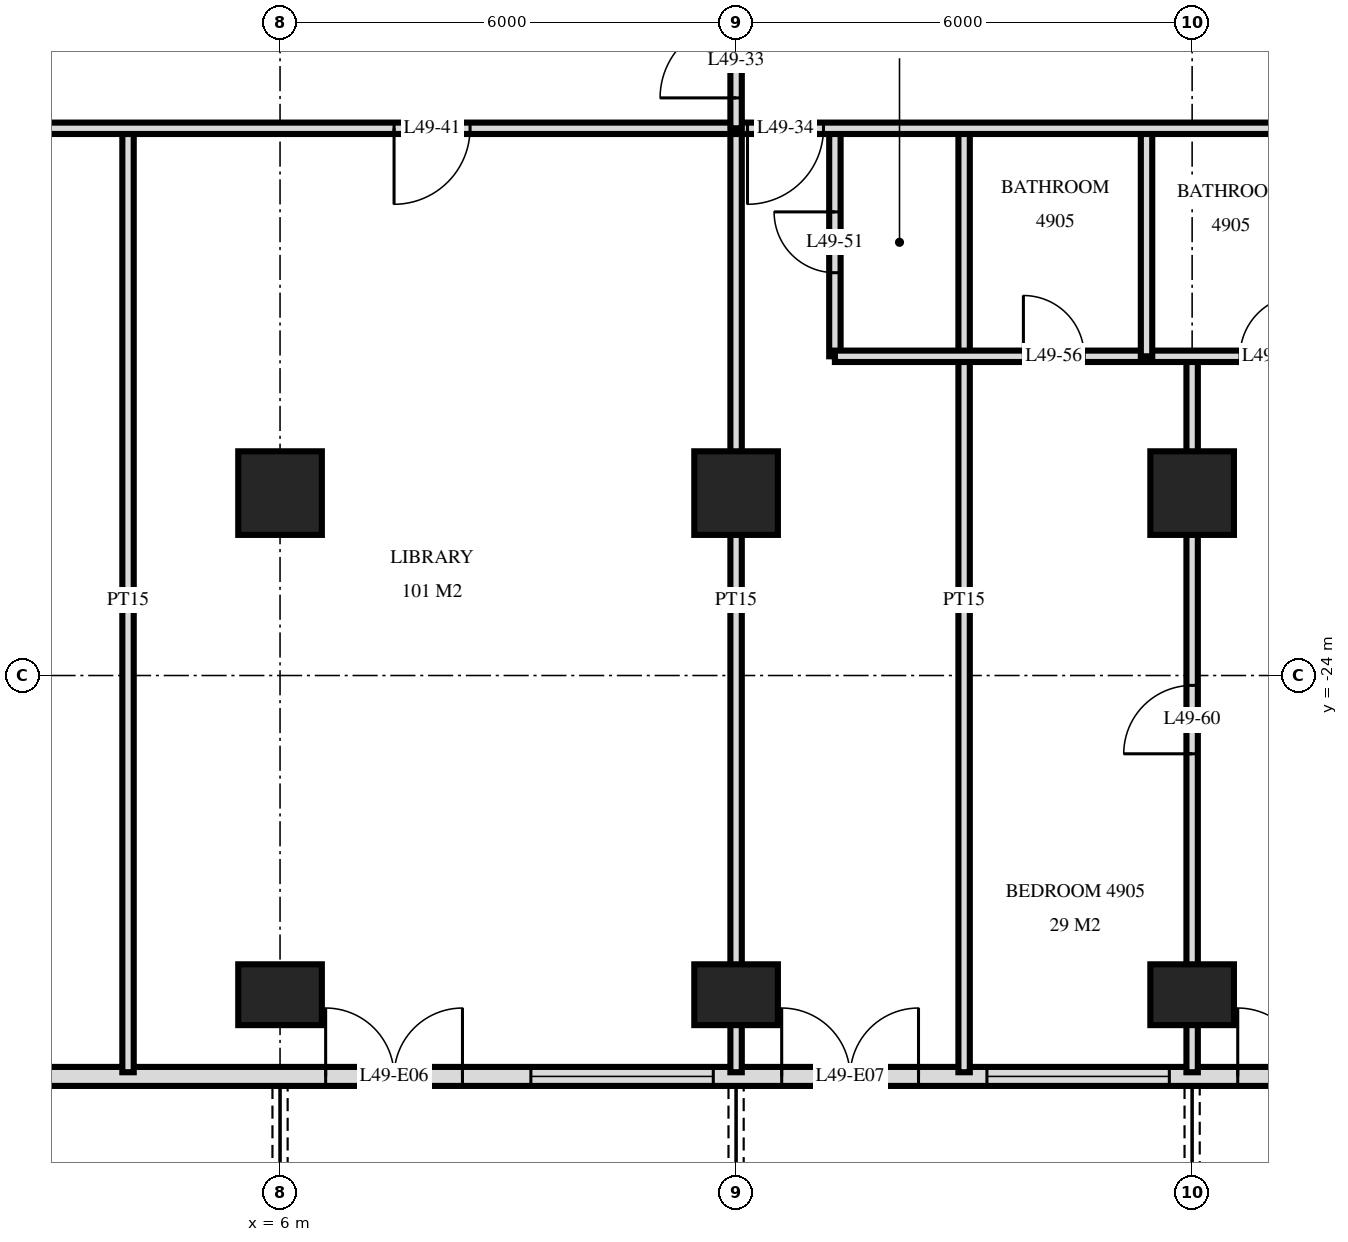
"""IFC4 building model, lengths in metres.
Left out: names, types, materials, properties, quantities, classifications, styles, units other than length and angle.
Written with IfcOpenShell. Run it as: python <this file> out.ifc"""

import sys

from ifc_helpers import new_model, si_unit, direction, frame, frame_2d, origin, origin_2d, place, context, subcontext, project, spatial, rectangle, extrude, element, fill, save


model = new_model("IFC4")
c1 = context("Model", 3, precision=1e-05, world=origin(), true_north=direction((0.0, 1.0)))
c2 = subcontext(c1, "Body", "Model", "MODEL_VIEW")
j1 = project(units=[si_unit("LENGTHUNIT", "METRE"), si_unit("PLANEANGLEUNIT", "RADIAN")], contexts=[c1])
p1 = place(None, origin())
s1 = spatial("IfcSite", under=j1, at=p1, CompositionType="ELEMENT")
p2 = place(p1, origin())
s2 = spatial("IfcBuilding", under=s1, at=p2, CompositionType="ELEMENT")
p3 = place(p2, frame((0.0, 0.0, 190.6)))
s3 = spatial("IfcBuildingStorey", under=s2, at=p3, CompositionType="ELEMENT", Elevation=190.6)
p4 = place(p3, frame((6.0, -28.2, 0.0), z_axis=(0.0, 0.0, 1.0), x_axis=(1.0, 0.0, 0.0)))
e1 = element("IfcColumn", 1, at=p4, inside=s3, PredefinedType="COLUMN", context=c2, shape_type="SweptSolid", body=[
    extrude(rectangle(XDim=1.1, YDim=0.8, at=origin_2d()), origin(), (0.0, 0.0, 1.0), 3.5),
])
p5 = place(p3, frame((6.0, -21.6, 0.0), z_axis=(0.0, 0.0, 1.0), x_axis=(1.0, 0.0, 0.0)))
e2 = element("IfcColumn", 2, at=p5, inside=s3, PredefinedType="COLUMN", context=c2, shape_type="SweptSolid", body=[
    extrude(rectangle(XDim=1.1, YDim=1.1, at=origin_2d()), origin(), (0.0, 0.0, 1.0), 3.5),
])
p6 = place(p3, frame((12.0, -28.2, 0.0), z_axis=(0.0, 0.0, 1.0), x_axis=(1.0, 0.0, 0.0)))
e3 = element("IfcColumn", 3, at=p6, inside=s3, PredefinedType="COLUMN", context=c2, shape_type="SweptSolid", body=[
    extrude(rectangle(XDim=1.1, YDim=0.8, at=origin_2d()), origin(), (0.0, 0.0, 1.0), 3.5),
])
p7 = place(p3, frame((12.0, -21.6, 0.0), z_axis=(0.0, 0.0, 1.0), x_axis=(1.0, 0.0, 0.0)))
e4 = element("IfcColumn", 4, at=p7, inside=s3, PredefinedType="COLUMN", context=c2, shape_type="SweptSolid", body=[
    extrude(rectangle(XDim=1.1, YDim=1.1, at=origin_2d()), origin(), (0.0, 0.0, 1.0), 3.5),
])
p8 = place(p3, frame((18.0, -28.2, 0.0), z_axis=(0.0, 0.0, 1.0), x_axis=(1.0, 0.0, 0.0)))
e5 = element("IfcColumn", 5, at=p8, inside=s3, PredefinedType="COLUMN", context=c2, shape_type="SweptSolid", body=[
    extrude(rectangle(XDim=1.1, YDim=0.8, at=origin_2d()), origin(), (0.0, 0.0, 1.0), 3.5),
])
p9 = place(p3, frame((18.0, -21.6, 0.0), z_axis=(0.0, 0.0, 1.0), x_axis=(1.0, 0.0, 0.0)))
e6 = element("IfcColumn", 6, at=p9, inside=s3, PredefinedType="COLUMN", context=c2, shape_type="SweptSolid", body=[
    extrude(rectangle(XDim=1.1, YDim=1.1, at=origin_2d()), origin(), (0.0, 0.0, 1.0), 3.5),
])
p10 = place(p3, frame((-22.475, -29.275, 0.0), z_axis=(0.0, 0.0, 1.0), x_axis=(1.0, 0.0, 0.0)))
e7 = element("IfcWall", 7, at=p10, inside=s3, PredefinedType="SOLIDWALL", context=c2, shape_type="SweptSolid", body=[
    extrude(rectangle(XDim=44.951, YDim=0.25, at=frame_2d((22.475, 0.0))), origin(), (0.0, 0.0, 1.0), 3.22),
])
p11 = place(p10, frame((0.575, 0.0, 0.0)))
e8 = element("IfcOpeningElement", 8, at=p11, cuts=e7, PredefinedType="OPENING", context=c2, shape_type="SweptSolid", body=[
    extrude(rectangle(XDim=1.8, YDim=2.4, at=frame_2d((0.9, 1.2))), frame((0.0, 0.135, 0.0), z_axis=(0.0, -1.0, 0.0), x_axis=(1.0, 0.0, 0.0)), (0.0, 0.0, 1.0), 0.27),
])
p12 = place(p10, frame((4.775, 0.0, 0.9)))
e9 = element("IfcOpeningElement", 9, at=p12, cuts=e7, PredefinedType="OPENING", context=c2, shape_type="SweptSolid", body=[
    extrude(rectangle(XDim=2.4, YDim=1.5, at=frame_2d((1.2, 0.75))), frame((0.0, 0.135, 0.0), z_axis=(0.0, -1.0, 0.0), x_axis=(1.0, 0.0, 0.0)), (0.0, 0.0, 1.0), 0.27),
])
p13 = place(p10, frame((8.075, 0.0, 0.0)))
e10 = element("IfcOpeningElement", 10, at=p13, cuts=e7, PredefinedType="OPENING", context=c2, shape_type="SweptSolid", body=[
    extrude(rectangle(XDim=1.8, YDim=2.4, at=frame_2d((0.9, 1.2))), frame((0.0, 0.135, 0.0), z_axis=(0.0, -1.0, 0.0), x_axis=(1.0, 0.0, 0.0)), (0.0, 0.0, 1.0), 0.27),
])
p14 = place(p10, frame((11.075, 0.0, 0.0)))
e11 = element("IfcOpeningElement", 11, at=p14, cuts=e7, PredefinedType="OPENING", context=c2, shape_type="SweptSolid", body=[
    extrude(rectangle(XDim=1.8, YDim=2.4, at=frame_2d((0.9, 1.2))), frame((0.0, 0.135, 0.0), z_axis=(0.0, -1.0, 0.0), x_axis=(1.0, 0.0, 0.0)), (0.0, 0.0, 1.0), 0.27),
])
p15 = place(p10, frame((13.775, 0.0, 0.9)))
e12 = element("IfcOpeningElement", 12, at=p15, cuts=e7, PredefinedType="OPENING", context=c2, shape_type="SweptSolid", body=[
    extrude(rectangle(XDim=2.4, YDim=1.5, at=frame_2d((1.2, 0.75))), frame((0.0, 0.135, 0.0), z_axis=(0.0, -1.0, 0.0), x_axis=(1.0, 0.0, 0.0)), (0.0, 0.0, 1.0), 0.27),
])
p16 = place(p10, frame((20.075, 0.0, 0.0)))
e13 = element("IfcOpeningElement", 13, at=p16, cuts=e7, PredefinedType="OPENING", context=c2, shape_type="SweptSolid", body=[
    extrude(rectangle(XDim=1.8, YDim=2.4, at=frame_2d((0.9, 1.2))), frame((0.0, 0.135, 0.0), z_axis=(0.0, -1.0, 0.0), x_axis=(1.0, 0.0, 0.0)), (0.0, 0.0, 1.0), 0.27),
])
p17 = place(p10, frame((23.075, 0.0, 0.0)))
e14 = element("IfcOpeningElement", 14, at=p17, cuts=e7, PredefinedType="OPENING", context=c2, shape_type="SweptSolid", body=[
    extrude(rectangle(XDim=1.8, YDim=2.4, at=frame_2d((0.9, 1.2))), frame((0.0, 0.135, 0.0), z_axis=(0.0, -1.0, 0.0), x_axis=(1.0, 0.0, 0.0)), (0.0, 0.0, 1.0), 0.27),
])
p18 = place(p10, frame((29.075, 0.0, 0.0)))
e15 = element("IfcOpeningElement", 15, at=p18, cuts=e7, PredefinedType="OPENING", context=c2, shape_type="SweptSolid", body=[
    extrude(rectangle(XDim=1.8, YDim=2.4, at=frame_2d((0.9, 1.2))), frame((0.0, 0.135, 0.0), z_axis=(0.0, -1.0, 0.0), x_axis=(1.0, 0.0, 0.0)), (0.0, 0.0, 1.0), 0.27),
])
p19 = place(p10, frame((31.775, 0.0, 0.9)))
e16 = element("IfcOpeningElement", 16, at=p19, cuts=e7, PredefinedType="OPENING", context=c2, shape_type="SweptSolid", body=[
    extrude(rectangle(XDim=2.4, YDim=1.5, at=frame_2d((1.2, 0.75))), frame((0.0, 0.135, 0.0), z_axis=(0.0, -1.0, 0.0), x_axis=(1.0, 0.0, 0.0)), (0.0, 0.0, 1.0), 0.27),
])
p20 = place(p10, frame((35.075, 0.0, 0.0)))
e17 = element("IfcOpeningElement", 17, at=p20, cuts=e7, PredefinedType="OPENING", context=c2, shape_type="SweptSolid", body=[
    extrude(rectangle(XDim=1.8, YDim=2.4, at=frame_2d((0.9, 1.2))), frame((0.0, 0.135, 0.0), z_axis=(0.0, -1.0, 0.0), x_axis=(1.0, 0.0, 0.0)), (0.0, 0.0, 1.0), 0.27),
])
p21 = place(p10, frame((37.775, 0.0, 0.9)))
e18 = element("IfcOpeningElement", 18, at=p21, cuts=e7, PredefinedType="OPENING", context=c2, shape_type="SweptSolid", body=[
    extrude(rectangle(XDim=2.4, YDim=1.5, at=frame_2d((1.2, 0.75))), frame((0.0, 0.135, 0.0), z_axis=(0.0, -1.0, 0.0), x_axis=(1.0, 0.0, 0.0)), (0.0, 0.0, 1.0), 0.27),
])
p22 = place(p10, frame((41.075, 0.0, 0.0)))
e19 = element("IfcOpeningElement", 19, at=p22, cuts=e7, PredefinedType="OPENING", context=c2, shape_type="SweptSolid", body=[
    extrude(rectangle(XDim=1.8, YDim=2.4, at=frame_2d((0.9, 1.2))), frame((0.0, 0.135, 0.0), z_axis=(0.0, -1.0, 0.0), x_axis=(1.0, 0.0, 0.0)), (0.0, 0.0, 1.0), 0.27),
])
p23 = place(p3, frame((18.0, -29.22, 0.0), z_axis=(0.0, 0.0, 1.0), x_axis=(0.0, 1.0, 0.0)))
e20 = element("IfcWall", 20, at=p23, inside=s3, PredefinedType="PARTITIONING", context=c2, shape_type="SweptSolid", body=[
    extrude(rectangle(XDim=9.42, YDim=0.15, at=frame_2d((4.71, 0.0))), origin(), (0.0, 0.0, 1.0), 3.22),
])
p24 = place(p23, frame((4.19, 0.0, 0.0)))
e21 = element("IfcOpeningElement", 21, at=p24, cuts=e20, PredefinedType="OPENING", context=c2, shape_type="SweptSolid", body=[
    extrude(rectangle(XDim=0.9, YDim=2.1, at=frame_2d((0.45, 1.05))), frame((0.0, 0.085, 0.0), z_axis=(0.0, -1.0, 0.0), x_axis=(1.0, 0.0, 0.0)), (0.0, 0.0, 1.0), 0.17),
])
p25 = place(p3, frame((17.4, -19.8, 0.0), z_axis=(0.0, 0.0, 1.0), x_axis=(0.0, 1.0, 0.0)))
e22 = element("IfcWall", 22, at=p25, inside=s3, PredefinedType="PARTITIONING", context=c2, shape_type="SweptSolid", body=[
    extrude(rectangle(XDim=3.0, YDim=0.15, at=frame_2d((1.5, 0.0))), origin(), (0.0, 0.0, 1.0), 3.22),
])
p26 = place(p3, frame((15.0, -29.22, 0.0), z_axis=(0.0, 0.0, 1.0), x_axis=(0.0, 1.0, 0.0)))
e23 = element("IfcWall", 23, at=p26, inside=s3, PredefinedType="PARTITIONING", context=c2, shape_type="SweptSolid", body=[
    extrude(rectangle(XDim=12.42, YDim=0.15, at=frame_2d((6.21, 0.0))), origin(), (0.0, 0.0, 1.0), 3.22),
])
p27 = place(p3, frame((13.3, -19.8, 0.0), z_axis=(0.0, 0.0, 1.0), x_axis=(0.0, 1.0, 0.0)))
e24 = element("IfcWall", 24, at=p27, inside=s3, PredefinedType="PARTITIONING", context=c2, shape_type="SweptSolid", body=[
    extrude(rectangle(XDim=3.0, YDim=0.15, at=frame_2d((1.5, 0.0))), origin(), (0.0, 0.0, 1.0), 3.22),
])
p28 = place(p27, frame((1.1, 0.0, 0.0)))
e25 = element("IfcOpeningElement", 25, at=p28, cuts=e24, PredefinedType="OPENING", context=c2, shape_type="SweptSolid", body=[
    extrude(rectangle(XDim=0.8, YDim=2.1, at=frame_2d((0.4, 1.05))), frame((0.0, 0.085, 0.0), z_axis=(0.0, -1.0, 0.0), x_axis=(1.0, 0.0, 0.0)), (0.0, 0.0, 1.0), 0.17),
])
p29 = place(p3, frame((12.0, -16.8, 0.0), z_axis=(0.0, 0.0, 1.0), x_axis=(0.0, 1.0, 0.0)))
e26 = element("IfcWall", 26, at=p29, inside=s3, PredefinedType="PARTITIONING", context=c2, shape_type="SweptSolid", body=[
    extrude(rectangle(XDim=1.75, YDim=0.15, at=frame_2d((0.875, 0.0))), origin(), (0.0, 0.0, 1.0), 3.22),
])
p30 = place(p29, frame((0.4, 0.0, 0.0)))
e27 = element("IfcOpeningElement", 27, at=p30, cuts=e26, PredefinedType="OPENING", context=c2, shape_type="SweptSolid", body=[
    extrude(rectangle(XDim=1.0, YDim=2.1, at=frame_2d((0.5, 1.05))), frame((0.0, 0.085, 0.0), z_axis=(0.0, -1.0, 0.0), x_axis=(1.0, 0.0, 0.0)), (0.0, 0.0, 1.0), 0.17),
])
for number, where, z_axis, x_axis in (
    (28, (12.0, -29.22, 0.0), (0.0, 0.0, 1.0), (0.0, 1.0, 0.0)),
    (29, (4.0, -29.22, 0.0), (0.0, 0.0, 1.0), (0.0, 1.0, 0.0)),
):
    element("IfcWall", number, at=place(p3, frame(where, z_axis=z_axis, x_axis=x_axis)), inside=s3, PredefinedType="PARTITIONING", context=c2, shape_type="SweptSolid", body=[
        extrude(rectangle(XDim=12.42, YDim=0.15, at=frame_2d((6.21, 0.0))), origin(), (0.0, 0.0, 1.0), 3.22),
    ])
p31 = place(p3, frame((13.3, -19.8, 0.0), z_axis=(0.0, 0.0, 1.0), x_axis=(1.0, 0.0, 0.0)))
e30 = element("IfcWall", 30, at=p31, inside=s3, PredefinedType="PARTITIONING", context=c2, shape_type="SweptSolid", body=[
    extrude(rectangle(XDim=8.1, YDim=0.15, at=frame_2d((4.05, 0.0))), origin(), (0.0, 0.0, 1.0), 3.22),
])
p32 = place(p31, frame((2.48, 0.0, 0.0)))
e31 = element("IfcOpeningElement", 31, at=p32, cuts=e30, PredefinedType="OPENING", context=c2, shape_type="SweptSolid", body=[
    extrude(rectangle(XDim=0.8, YDim=2.1, at=frame_2d((0.4, 1.05))), frame((0.0, 0.085, 0.0), z_axis=(0.0, -1.0, 0.0), x_axis=(1.0, 0.0, 0.0)), (0.0, 0.0, 1.0), 0.17),
])
p33 = place(p31, frame((5.33, 0.0, 0.0)))
e32 = element("IfcOpeningElement", 32, at=p33, cuts=e30, PredefinedType="OPENING", context=c2, shape_type="SweptSolid", body=[
    extrude(rectangle(XDim=0.8, YDim=2.1, at=frame_2d((0.4, 1.05))), frame((0.0, 0.085, 0.0), z_axis=(0.0, -1.0, 0.0), x_axis=(1.0, 0.0, 0.0)), (0.0, 0.0, 1.0), 0.17),
])
p34 = place(p3, frame((-26.82, -16.8, 0.0), z_axis=(0.0, 0.0, 1.0), x_axis=(1.0, 0.0, 0.0)))
e33 = element("IfcWall", 33, at=p34, inside=s3, PredefinedType="PARTITIONING", context=c2, shape_type="SweptSolid", body=[
    extrude(rectangle(XDim=53.64, YDim=0.15, at=frame_2d((26.82, 0.0))), origin(), (0.0, 0.0, 1.0), 3.22),
])
p35 = place(p34, frame((11.97, 0.0, 0.0)))
e34 = element("IfcOpeningElement", 34, at=p35, cuts=e33, PredefinedType="OPENING", context=c2, shape_type="SweptSolid", body=[
    extrude(rectangle(XDim=1.0, YDim=2.1, at=frame_2d((0.5, 1.05))), frame((0.0, 0.085, 0.0), z_axis=(0.0, -1.0, 0.0), x_axis=(1.0, 0.0, 0.0)), (0.0, 0.0, 1.0), 0.17),
])
p36 = place(p34, frame((10.67, 0.0, 0.0)))
e35 = element("IfcOpeningElement", 35, at=p36, cuts=e33, PredefinedType="OPENING", context=c2, shape_type="SweptSolid", body=[
    extrude(rectangle(XDim=1.0, YDim=2.1, at=frame_2d((0.5, 1.05))), frame((0.0, 0.085, 0.0), z_axis=(0.0, -1.0, 0.0), x_axis=(1.0, 0.0, 0.0)), (0.0, 0.0, 1.0), 0.17),
])
p37 = place(p34, frame((3.22, 0.0, 0.0)))
e36 = element("IfcOpeningElement", 36, at=p37, cuts=e33, PredefinedType="OPENING", context=c2, shape_type="SweptSolid", body=[
    extrude(rectangle(XDim=1.0, YDim=2.1, at=frame_2d((0.5, 1.05))), frame((0.0, 0.085, 0.0), z_axis=(0.0, -1.0, 0.0), x_axis=(1.0, 0.0, 0.0)), (0.0, 0.0, 1.0), 0.17),
])
p38 = place(p34, frame((5.02, 0.0, 0.0)))
e37 = element("IfcOpeningElement", 37, at=p38, cuts=e33, PredefinedType="OPENING", context=c2, shape_type="SweptSolid", body=[
    extrude(rectangle(XDim=1.0, YDim=2.1, at=frame_2d((0.5, 1.05))), frame((0.0, 0.085, 0.0), z_axis=(0.0, -1.0, 0.0), x_axis=(1.0, 0.0, 0.0)), (0.0, 0.0, 1.0), 0.17),
])
p39 = place(p34, frame((38.97, 0.0, 0.0)))
e38 = element("IfcOpeningElement", 38, at=p39, cuts=e33, PredefinedType="OPENING", context=c2, shape_type="SweptSolid", body=[
    extrude(rectangle(XDim=1.0, YDim=2.1, at=frame_2d((0.5, 1.05))), frame((0.0, 0.085, 0.0), z_axis=(0.0, -1.0, 0.0), x_axis=(1.0, 0.0, 0.0)), (0.0, 0.0, 1.0), 0.17),
])
p40 = place(p34, frame((48.72, 0.0, 0.0)))
e39 = element("IfcOpeningElement", 39, at=p40, cuts=e33, PredefinedType="OPENING", context=c2, shape_type="SweptSolid", body=[
    extrude(rectangle(XDim=1.0, YDim=2.1, at=frame_2d((0.5, 1.05))), frame((0.0, 0.085, 0.0), z_axis=(0.0, -1.0, 0.0), x_axis=(1.0, 0.0, 0.0)), (0.0, 0.0, 1.0), 0.17),
])
p41 = place(p34, frame((46.92, 0.0, 0.0)))
e40 = element("IfcOpeningElement", 40, at=p41, cuts=e33, PredefinedType="OPENING", context=c2, shape_type="SweptSolid", body=[
    extrude(rectangle(XDim=1.0, YDim=2.1, at=frame_2d((0.5, 1.05))), frame((0.0, 0.085, 0.0), z_axis=(0.0, -1.0, 0.0), x_axis=(1.0, 0.0, 0.0)), (0.0, 0.0, 1.0), 0.17),
])
p42 = place(p34, frame((18.32, 0.0, 0.0)))
e41 = element("IfcOpeningElement", 41, at=p42, cuts=e33, PredefinedType="OPENING", context=c2, shape_type="SweptSolid", body=[
    extrude(rectangle(XDim=1.0, YDim=2.1, at=frame_2d((0.5, 1.05))), frame((0.0, 0.085, 0.0), z_axis=(0.0, -1.0, 0.0), x_axis=(1.0, 0.0, 0.0)), (0.0, 0.0, 1.0), 0.17),
])
p43 = place(p34, frame((26.32, 0.0, 0.0)))
e42 = element("IfcOpeningElement", 42, at=p43, cuts=e33, PredefinedType="OPENING", context=c2, shape_type="SweptSolid", body=[
    extrude(rectangle(XDim=1.0, YDim=2.1, at=frame_2d((0.5, 1.05))), frame((0.0, 0.085, 0.0), z_axis=(0.0, -1.0, 0.0), x_axis=(1.0, 0.0, 0.0)), (0.0, 0.0, 1.0), 0.17),
])
p44 = place(p34, frame((34.32, 0.0, 0.0)))
e43 = element("IfcOpeningElement", 43, at=p44, cuts=e33, PredefinedType="OPENING", context=c2, shape_type="SweptSolid", body=[
    extrude(rectangle(XDim=1.0, YDim=2.1, at=frame_2d((0.5, 1.05))), frame((0.0, 0.085, 0.0), z_axis=(0.0, -1.0, 0.0), x_axis=(1.0, 0.0, 0.0)), (0.0, 0.0, 1.0), 0.17),
])
p45 = place(p18, origin())
e44 = element("IfcDoor", 44, at=p45, inside=s3, OperationType="DOUBLE_DOOR_SINGLE_SWING", PredefinedType="DOOR", context=c2, shape_type="SweptSolid", body=[
    extrude(rectangle(XDim=1.8, YDim=2.4, at=frame_2d((0.9, 1.2))), frame((0.0, 0.025, 0.0), z_axis=(0.0, -1.0, 0.0), x_axis=(1.0, 0.0, 0.0)), (0.0, 0.0, 1.0), 0.05),
])
fill(e15, e44)
p46 = place(p19, origin())
e45 = element("IfcWindow", 45, at=p46, inside=s3, PartitioningType="SINGLE_PANEL", PredefinedType="WINDOW", context=c2, shape_type="SweptSolid", body=[
    extrude(rectangle(XDim=2.4, YDim=1.5, at=frame_2d((1.2, 0.75))), frame((0.0, 0.03, 0.0), z_axis=(0.0, -1.0, 0.0), x_axis=(1.0, 0.0, 0.0)), (0.0, 0.0, 1.0), 0.06),
])
fill(e16, e45)
p47 = place(p20, origin())
e46 = element("IfcDoor", 46, at=p47, inside=s3, OperationType="DOUBLE_DOOR_SINGLE_SWING", PredefinedType="DOOR", context=c2, shape_type="SweptSolid", body=[
    extrude(rectangle(XDim=1.8, YDim=2.4, at=frame_2d((0.9, 1.2))), frame((0.0, 0.025, 0.0), z_axis=(0.0, -1.0, 0.0), x_axis=(1.0, 0.0, 0.0)), (0.0, 0.0, 1.0), 0.05),
])
fill(e17, e46)
p48 = place(p21, origin())
e47 = element("IfcWindow", 47, at=p48, inside=s3, PartitioningType="SINGLE_PANEL", PredefinedType="WINDOW", context=c2, shape_type="SweptSolid", body=[
    extrude(rectangle(XDim=2.4, YDim=1.5, at=frame_2d((1.2, 0.75))), frame((0.0, 0.03, 0.0), z_axis=(0.0, -1.0, 0.0), x_axis=(1.0, 0.0, 0.0)), (0.0, 0.0, 1.0), 0.06),
])
fill(e18, e47)
p49 = place(p22, origin())
e48 = element("IfcDoor", 48, at=p49, inside=s3, OperationType="DOUBLE_DOOR_SINGLE_SWING", PredefinedType="DOOR", context=c2, shape_type="SweptSolid", body=[
    extrude(rectangle(XDim=1.8, YDim=2.4, at=frame_2d((0.9, 1.2))), frame((0.0, 0.025, 0.0), z_axis=(0.0, -1.0, 0.0), x_axis=(1.0, 0.0, 0.0)), (0.0, 0.0, 1.0), 0.05),
])
fill(e19, e48)
p50 = place(p30, origin())
e49 = element("IfcDoor", 49, at=p50, inside=s3, OperationType="SINGLE_SWING_RIGHT", PredefinedType="DOOR", context=c2, shape_type="SweptSolid", body=[
    extrude(rectangle(XDim=1.0, YDim=2.1, at=frame_2d((0.5, 1.05))), frame((0.0, 0.025, 0.0), z_axis=(0.0, -1.0, 0.0), x_axis=(1.0, 0.0, 0.0)), (0.0, 0.0, 1.0), 0.05),
])
fill(e27, e49)
p51 = place(p39, frame((0.5, 0.0, 0.0), z_axis=(0.0, 0.0, 1.0), x_axis=(-1.0, 0.0, 0.0)))
e50 = element("IfcDoor", 50, at=p51, inside=s3, OperationType="SINGLE_SWING_LEFT", PredefinedType="DOOR", context=c2, shape_type="SweptSolid", body=[
    extrude(rectangle(XDim=1.0, YDim=2.1, at=frame_2d((0.0, 1.05))), frame((0.0, -0.025, 0.0), z_axis=(0.0, 1.0, 0.0), x_axis=(-1.0, 0.0, 0.0)), (0.0, 0.0, 1.0), 0.05),
])
fill(e38, e50)
p52 = place(p44, frame((0.5, 0.0, 0.0), z_axis=(0.0, 0.0, 1.0), x_axis=(-1.0, 0.0, 0.0)))
e51 = element("IfcDoor", 51, at=p52, inside=s3, OperationType="SINGLE_SWING_LEFT", PredefinedType="DOOR", context=c2, shape_type="SweptSolid", body=[
    extrude(rectangle(XDim=1.0, YDim=2.1, at=frame_2d((0.0, 1.05))), frame((0.0, -0.025, 0.0), z_axis=(0.0, 1.0, 0.0), x_axis=(-1.0, 0.0, 0.0)), (0.0, 0.0, 1.0), 0.05),
])
fill(e43, e51)
p53 = place(p28, origin())
e52 = element("IfcDoor", 52, at=p53, inside=s3, OperationType="SINGLE_SWING_LEFT", PredefinedType="DOOR", context=c2, shape_type="SweptSolid", body=[
    extrude(rectangle(XDim=0.8, YDim=2.1, at=frame_2d((0.4, 1.05))), frame((0.0, 0.025, 0.0), z_axis=(0.0, -1.0, 0.0), x_axis=(1.0, 0.0, 0.0)), (0.0, 0.0, 1.0), 0.05),
])
fill(e25, e52)
p54 = place(p32, origin())
e53 = element("IfcDoor", 53, at=p54, inside=s3, OperationType="SINGLE_SWING_RIGHT", PredefinedType="DOOR", context=c2, shape_type="SweptSolid", body=[
    extrude(rectangle(XDim=0.8, YDim=2.1, at=frame_2d((0.4, 1.05))), frame((0.0, 0.025, 0.0), z_axis=(0.0, -1.0, 0.0), x_axis=(1.0, 0.0, 0.0)), (0.0, 0.0, 1.0), 0.05),
])
fill(e31, e53)
p55 = place(p33, origin())
e54 = element("IfcDoor", 54, at=p55, inside=s3, OperationType="SINGLE_SWING_LEFT", PredefinedType="DOOR", context=c2, shape_type="SweptSolid", body=[
    extrude(rectangle(XDim=0.8, YDim=2.1, at=frame_2d((0.4, 1.05))), frame((0.0, 0.025, 0.0), z_axis=(0.0, -1.0, 0.0), x_axis=(1.0, 0.0, 0.0)), (0.0, 0.0, 1.0), 0.05),
])
fill(e32, e54)
p56 = place(p24, origin())
e55 = element("IfcDoor", 55, at=p56, inside=s3, OperationType="SINGLE_SWING_RIGHT", PredefinedType="DOOR", context=c2, shape_type="SweptSolid", body=[
    extrude(rectangle(XDim=0.9, YDim=2.1, at=frame_2d((0.45, 1.05))), frame((0.0, 0.025, 0.0), z_axis=(0.0, -1.0, 0.0), x_axis=(1.0, 0.0, 0.0)), (0.0, 0.0, 1.0), 0.05),
])
fill(e21, e55)
save(model, sys.argv[1])
